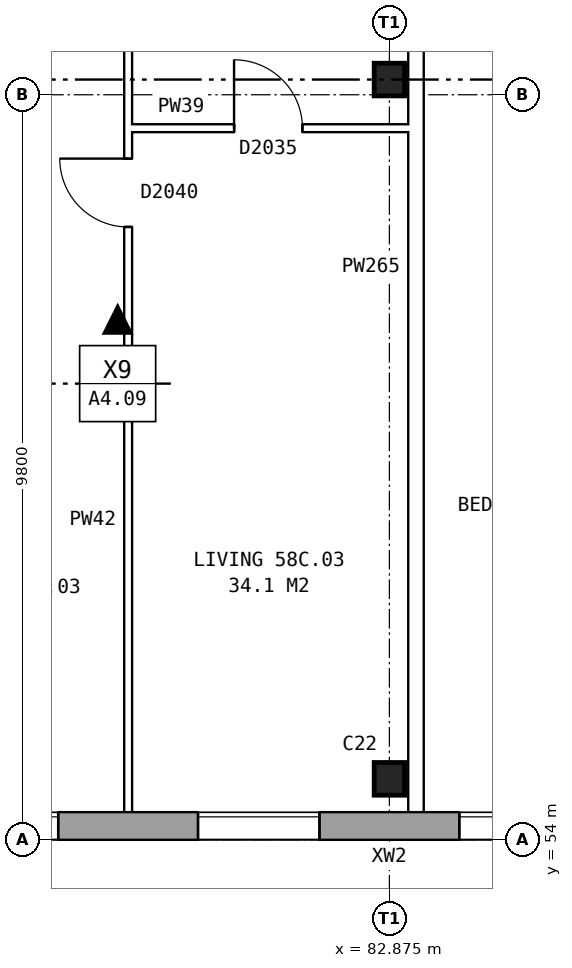
"""IFC4 building model, lengths in metres.
Left out: names, types, materials, properties, quantities, classifications, styles, units other than length and angle.
Written with IfcOpenShell. Run it as: python <this file> out.ifc"""

import sys

from ifc_helpers import new_model, si_unit, direction, frame, frame_2d, origin, origin_2d, place, context, subcontext, project, spatial, rectangle, i_section, extrude, element, fill, save


model = new_model("IFC4")
c1 = context("Model", 3, precision=1e-05, world=origin(), true_north=direction((0.0, 1.0)))
c2 = subcontext(c1, "Body", "Model", "MODEL_VIEW")
j1 = project(units=[si_unit("LENGTHUNIT", "METRE"), si_unit("PLANEANGLEUNIT", "RADIAN")], contexts=[c1])
p1 = place(None, origin())
s1 = spatial("IfcSite", under=j1, at=p1, CompositionType="ELEMENT")
p2 = place(p1, origin())
s2 = spatial("IfcBuilding", under=s1, at=p2, CompositionType="ELEMENT")
p3 = place(p2, frame((0.0, 0.0, 205.9)))
s3 = spatial("IfcBuildingStorey", under=s2, at=p3, CompositionType="ELEMENT", Elevation=205.9)
for number, where, z_axis, x_axis in (
    (1, (82.875, 54.8, 0.0), (0.0, 0.0, 1.0), (1.0, 0.0, 0.0)),
    (2, (82.875, 64.0, 0.0), (0.0, 0.0, 1.0), (1.0, 0.0, 0.0)),
):
    element("IfcColumn", number, at=place(p3, frame(where, z_axis=z_axis, x_axis=x_axis)), inside=s3, PredefinedType="COLUMN", context=c2, shape_type="SweptSolid", body=[
        extrude(i_section(OverallWidth=0.4, OverallDepth=0.43, WebThickness=0.04, FlangeThickness=0.04, at=origin_2d()), origin(), (0.0, 0.0, 1.0), 2.85),
    ])
p4 = place(p3, frame((75.95, 54.18, 0.0), z_axis=(0.0, 0.0, 1.0), x_axis=(1.0, 0.0, 0.0)))
e3 = element("IfcWall", 3, at=p4, inside=s3, PredefinedType="STANDARD", context=c2, shape_type="SweptSolid", body=[
    extrude(rectangle(XDim=55.1, YDim=0.36, at=frame_2d((27.55, 0.0))), origin(), (0.0, 0.0, 1.0), 2.85),
])
p5 = place(p4, frame((0.969, 0.0, 0.8)))
e4 = element("IfcOpeningElement", 4, at=p5, cuts=e3, PredefinedType="OPENING", context=c2, shape_type="SweptSolid", body=[
    extrude(rectangle(XDim=1.6, YDim=1.8, at=frame_2d((0.8, 0.9))), frame((0.0, 0.19, 0.0), z_axis=(0.0, -1.0, 0.0), x_axis=(1.0, 0.0, 0.0)), (0.0, 0.0, 1.0), 0.38),
])
p6 = place(p4, frame((4.406, 0.0, 0.8)))
e5 = element("IfcOpeningElement", 5, at=p6, cuts=e3, PredefinedType="OPENING", context=c2, shape_type="SweptSolid", body=[
    extrude(rectangle(XDim=1.6, YDim=1.8, at=frame_2d((0.8, 0.9))), frame((0.0, 0.19, 0.0), z_axis=(0.0, -1.0, 0.0), x_axis=(1.0, 0.0, 0.0)), (0.0, 0.0, 1.0), 0.38),
])
p7 = place(p4, frame((7.844, 0.0, 0.8)))
e6 = element("IfcOpeningElement", 6, at=p7, cuts=e3, PredefinedType="OPENING", context=c2, shape_type="SweptSolid", body=[
    extrude(rectangle(XDim=1.6, YDim=1.8, at=frame_2d((0.8, 0.9))), frame((0.0, 0.19, 0.0), z_axis=(0.0, -1.0, 0.0), x_axis=(1.0, 0.0, 0.0)), (0.0, 0.0, 1.0), 0.38),
])
p8 = place(p4, frame((11.281, 0.0, 0.8)))
e7 = element("IfcOpeningElement", 7, at=p8, cuts=e3, PredefinedType="OPENING", context=c2, shape_type="SweptSolid", body=[
    extrude(rectangle(XDim=1.6, YDim=1.8, at=frame_2d((0.8, 0.9))), frame((0.0, 0.19, 0.0), z_axis=(0.0, -1.0, 0.0), x_axis=(1.0, 0.0, 0.0)), (0.0, 0.0, 1.0), 0.38),
])
p9 = place(p4, frame((14.719, 0.0, 0.8)))
e8 = element("IfcOpeningElement", 8, at=p9, cuts=e3, PredefinedType="OPENING", context=c2, shape_type="SweptSolid", body=[
    extrude(rectangle(XDim=1.6, YDim=1.8, at=frame_2d((0.8, 0.9))), frame((0.0, 0.19, 0.0), z_axis=(0.0, -1.0, 0.0), x_axis=(1.0, 0.0, 0.0)), (0.0, 0.0, 1.0), 0.38),
])
p10 = place(p4, frame((18.156, 0.0, 0.8)))
e9 = element("IfcOpeningElement", 9, at=p10, cuts=e3, PredefinedType="OPENING", context=c2, shape_type="SweptSolid", body=[
    extrude(rectangle(XDim=1.6, YDim=1.8, at=frame_2d((0.8, 0.9))), frame((0.0, 0.19, 0.0), z_axis=(0.0, -1.0, 0.0), x_axis=(1.0, 0.0, 0.0)), (0.0, 0.0, 1.0), 0.38),
])
p11 = place(p4, frame((21.594, 0.0, 0.8)))
e10 = element("IfcOpeningElement", 10, at=p11, cuts=e3, PredefinedType="OPENING", context=c2, shape_type="SweptSolid", body=[
    extrude(rectangle(XDim=1.6, YDim=1.8, at=frame_2d((0.8, 0.9))), frame((0.0, 0.19, 0.0), z_axis=(0.0, -1.0, 0.0), x_axis=(1.0, 0.0, 0.0)), (0.0, 0.0, 1.0), 0.38),
])
p12 = place(p4, frame((25.031, 0.0, 0.8)))
e11 = element("IfcOpeningElement", 11, at=p12, cuts=e3, PredefinedType="OPENING", context=c2, shape_type="SweptSolid", body=[
    extrude(rectangle(XDim=1.6, YDim=1.8, at=frame_2d((0.8, 0.9))), frame((0.0, 0.19, 0.0), z_axis=(0.0, -1.0, 0.0), x_axis=(1.0, 0.0, 0.0)), (0.0, 0.0, 1.0), 0.38),
])
p13 = place(p4, frame((28.469, 0.0, 0.8)))
e12 = element("IfcOpeningElement", 12, at=p13, cuts=e3, PredefinedType="OPENING", context=c2, shape_type="SweptSolid", body=[
    extrude(rectangle(XDim=1.6, YDim=1.8, at=frame_2d((0.8, 0.9))), frame((0.0, 0.19, 0.0), z_axis=(0.0, -1.0, 0.0), x_axis=(1.0, 0.0, 0.0)), (0.0, 0.0, 1.0), 0.38),
])
p14 = place(p4, frame((31.906, 0.0, 0.8)))
e13 = element("IfcOpeningElement", 13, at=p14, cuts=e3, PredefinedType="OPENING", context=c2, shape_type="SweptSolid", body=[
    extrude(rectangle(XDim=1.6, YDim=1.8, at=frame_2d((0.8, 0.9))), frame((0.0, 0.19, 0.0), z_axis=(0.0, -1.0, 0.0), x_axis=(1.0, 0.0, 0.0)), (0.0, 0.0, 1.0), 0.38),
])
p15 = place(p4, frame((35.344, 0.0, 0.8)))
e14 = element("IfcOpeningElement", 14, at=p15, cuts=e3, PredefinedType="OPENING", context=c2, shape_type="SweptSolid", body=[
    extrude(rectangle(XDim=1.6, YDim=1.8, at=frame_2d((0.8, 0.9))), frame((0.0, 0.19, 0.0), z_axis=(0.0, -1.0, 0.0), x_axis=(1.0, 0.0, 0.0)), (0.0, 0.0, 1.0), 0.38),
])
p16 = place(p4, frame((38.781, 0.0, 0.8)))
e15 = element("IfcOpeningElement", 15, at=p16, cuts=e3, PredefinedType="OPENING", context=c2, shape_type="SweptSolid", body=[
    extrude(rectangle(XDim=1.6, YDim=1.8, at=frame_2d((0.8, 0.9))), frame((0.0, 0.19, 0.0), z_axis=(0.0, -1.0, 0.0), x_axis=(1.0, 0.0, 0.0)), (0.0, 0.0, 1.0), 0.38),
])
p17 = place(p4, frame((42.219, 0.0, 0.8)))
e16 = element("IfcOpeningElement", 16, at=p17, cuts=e3, PredefinedType="OPENING", context=c2, shape_type="SweptSolid", body=[
    extrude(rectangle(XDim=1.6, YDim=1.8, at=frame_2d((0.8, 0.9))), frame((0.0, 0.19, 0.0), z_axis=(0.0, -1.0, 0.0), x_axis=(1.0, 0.0, 0.0)), (0.0, 0.0, 1.0), 0.38),
])
p18 = place(p4, frame((45.656, 0.0, 0.8)))
e17 = element("IfcOpeningElement", 17, at=p18, cuts=e3, PredefinedType="OPENING", context=c2, shape_type="SweptSolid", body=[
    extrude(rectangle(XDim=1.6, YDim=1.8, at=frame_2d((0.8, 0.9))), frame((0.0, 0.19, 0.0), z_axis=(0.0, -1.0, 0.0), x_axis=(1.0, 0.0, 0.0)), (0.0, 0.0, 1.0), 0.38),
])
p19 = place(p4, frame((49.094, 0.0, 0.8)))
e18 = element("IfcOpeningElement", 18, at=p19, cuts=e3, PredefinedType="OPENING", context=c2, shape_type="SweptSolid", body=[
    extrude(rectangle(XDim=1.6, YDim=1.8, at=frame_2d((0.8, 0.9))), frame((0.0, 0.19, 0.0), z_axis=(0.0, -1.0, 0.0), x_axis=(1.0, 0.0, 0.0)), (0.0, 0.0, 1.0), 0.38),
])
p20 = place(p4, frame((52.531, 0.0, 0.8)))
e19 = element("IfcOpeningElement", 19, at=p20, cuts=e3, PredefinedType="OPENING", context=c2, shape_type="SweptSolid", body=[
    extrude(rectangle(XDim=1.6, YDim=1.8, at=frame_2d((0.8, 0.9))), frame((0.0, 0.19, 0.0), z_axis=(0.0, -1.0, 0.0), x_axis=(1.0, 0.0, 0.0)), (0.0, 0.0, 1.0), 0.38),
])
p21 = place(p3, frame((79.438, 63.36, 0.0), z_axis=(0.0, 0.0, 1.0), x_axis=(1.0, 0.0, 0.0)))
e20 = element("IfcWall", 20, at=p21, inside=s3, PredefinedType="PARTITIONING", context=c2, shape_type="SweptSolid", body=[
    extrude(rectangle(XDim=3.687, YDim=0.1, at=frame_2d((1.844, 0.0))), origin(), (0.0, 0.0, 1.0), 2.85),
])
p22 = place(p21, frame((1.394, 0.0, 0.0)))
e21 = element("IfcOpeningElement", 21, at=p22, cuts=e20, PredefinedType="OPENING", context=c2, shape_type="SweptSolid", body=[
    extrude(rectangle(XDim=0.9, YDim=2.1, at=frame_2d((0.45, 1.05))), frame((0.0, 0.06, 0.0), z_axis=(0.0, -1.0, 0.0), x_axis=(1.0, 0.0, 0.0)), (0.0, 0.0, 1.0), 0.12),
])
p23 = place(p3, frame((79.438, 54.36, 0.0), z_axis=(0.0, 0.0, 1.0), x_axis=(0.0, 1.0, 0.0)))
e22 = element("IfcWall", 22, at=p23, inside=s3, PredefinedType="PARTITIONING", context=c2, shape_type="SweptSolid", body=[
    extrude(rectangle(XDim=14.34, YDim=0.1, at=frame_2d((7.17, 0.0))), origin(), (0.0, 0.0, 1.0), 2.85),
])
p24 = place(p23, frame((7.7, 0.0, 0.0)))
e23 = element("IfcOpeningElement", 23, at=p24, cuts=e22, PredefinedType="OPENING", context=c2, shape_type="SweptSolid", body=[
    extrude(rectangle(XDim=0.9, YDim=2.1, at=frame_2d((0.45, 1.05))), frame((0.0, 0.06, 0.0), z_axis=(0.0, -1.0, 0.0), x_axis=(1.0, 0.0, 0.0)), (0.0, 0.0, 1.0), 0.12),
])
p25 = place(p23, frame((13.04, 0.0, 0.0)))
e24 = element("IfcOpeningElement", 24, at=p25, cuts=e22, PredefinedType="OPENING", context=c2, shape_type="SweptSolid", body=[
    extrude(rectangle(XDim=0.9, YDim=2.1, at=frame_2d((0.45, 1.05))), frame((0.0, 0.06, 0.0), z_axis=(0.0, -1.0, 0.0), x_axis=(1.0, 0.0, 0.0)), (0.0, 0.0, 1.0), 0.12),
])
p26 = place(p3, frame((83.225, 54.36, 0.0), z_axis=(0.0, 0.0, 1.0), x_axis=(0.0, 1.0, 0.0)))
e25 = element("IfcWall", 25, at=p26, inside=s3, PredefinedType="PARTITIONING", context=c2, shape_type="SweptSolid", body=[
    extrude(rectangle(XDim=14.34, YDim=0.2, at=frame_2d((7.17, 0.0))), origin(), (0.0, 0.0, 1.0), 2.85),
])
p27 = place(p5, origin())
e26 = element("IfcWindow", 26, at=p27, inside=s3, PartitioningType="SINGLE_PANEL", PredefinedType="WINDOW", context=c2, shape_type="SweptSolid", body=[
    extrude(rectangle(XDim=1.6, YDim=1.8, at=frame_2d((0.8, 0.9))), frame((0.0, 0.15, 0.0), z_axis=(0.0, -1.0, 0.0), x_axis=(1.0, 0.0, 0.0)), (0.0, 0.0, 1.0), 0.06),
])
fill(e4, e26)
p28 = place(p6, origin())
e27 = element("IfcWindow", 27, at=p28, inside=s3, PartitioningType="SINGLE_PANEL", PredefinedType="WINDOW", context=c2, shape_type="SweptSolid", body=[
    extrude(rectangle(XDim=1.6, YDim=1.8, at=frame_2d((0.8, 0.9))), frame((0.0, 0.15, 0.0), z_axis=(0.0, -1.0, 0.0), x_axis=(1.0, 0.0, 0.0)), (0.0, 0.0, 1.0), 0.06),
])
fill(e5, e27)
p29 = place(p7, origin())
e28 = element("IfcWindow", 28, at=p29, inside=s3, PartitioningType="SINGLE_PANEL", PredefinedType="WINDOW", context=c2, shape_type="SweptSolid", body=[
    extrude(rectangle(XDim=1.6, YDim=1.8, at=frame_2d((0.8, 0.9))), frame((0.0, 0.15, 0.0), z_axis=(0.0, -1.0, 0.0), x_axis=(1.0, 0.0, 0.0)), (0.0, 0.0, 1.0), 0.06),
])
fill(e6, e28)
p30 = place(p24, origin())
e29 = element("IfcDoor", 29, at=p30, inside=s3, OperationType="SINGLE_SWING_RIGHT", PredefinedType="DOOR", context=c2, shape_type="SweptSolid", body=[
    extrude(rectangle(XDim=0.9, YDim=2.1, at=frame_2d((0.45, 1.05))), frame((0.0, 0.025, 0.0), z_axis=(0.0, -1.0, 0.0), x_axis=(1.0, 0.0, 0.0)), (0.0, 0.0, 1.0), 0.05),
])
fill(e23, e29)
p31 = place(p22, origin())
e30 = element("IfcDoor", 30, at=p31, inside=s3, OperationType="SINGLE_SWING_LEFT", PredefinedType="DOOR", context=c2, shape_type="SweptSolid", body=[
    extrude(rectangle(XDim=0.9, YDim=2.1, at=frame_2d((0.45, 1.05))), frame((0.0, 0.025, 0.0), z_axis=(0.0, -1.0, 0.0), x_axis=(1.0, 0.0, 0.0)), (0.0, 0.0, 1.0), 0.05),
])
fill(e21, e30)
save(model, sys.argv[1])
